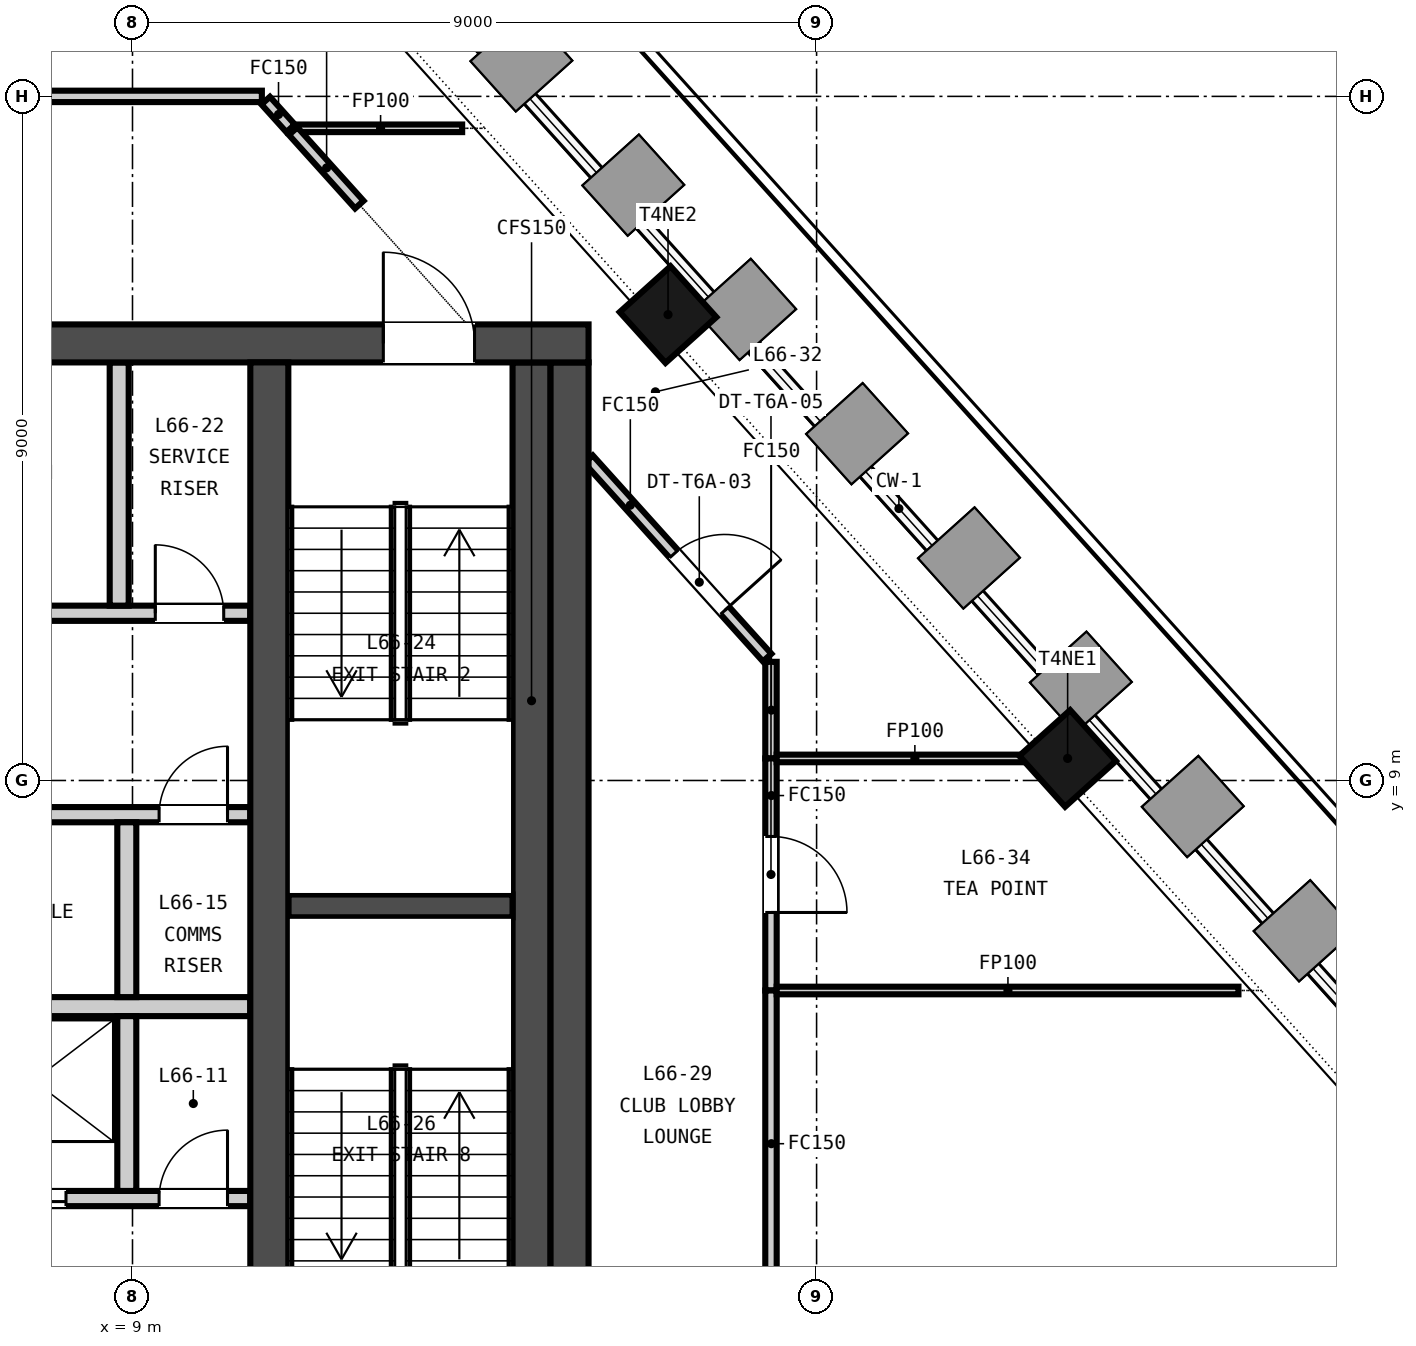
"""IFC4 building model, lengths in metres.
Left out: names, types, materials, properties, quantities, classifications, styles, units other than length and angle.
Written with IfcOpenShell. Run it as: python <this file> out.ifc"""

import sys

from ifc_helpers import new_model, si_unit, direction, frame, frame_2d, origin, origin_2d, place, context, subcontext, project, spatial, rectangle, extrude, element, fill, save


model = new_model("IFC4")
c1 = context("Model", 3, precision=1e-05, world=origin(), true_north=direction((0.0, 1.0)))
c2 = subcontext(c1, "Body", "Model", "MODEL_VIEW")
j1 = project(units=[si_unit("LENGTHUNIT", "METRE"), si_unit("PLANEANGLEUNIT", "RADIAN")], contexts=[c1])
p1 = place(None, origin())
s1 = spatial("IfcSite", under=j1, at=p1, CompositionType="ELEMENT")
p2 = place(p1, origin())
s2 = spatial("IfcBuilding", under=s1, at=p2, CompositionType="ELEMENT")
p3 = place(p2, frame((0.0, 0.0, 260.95)))
s3 = spatial("IfcBuildingStorey", under=s2, at=p3, CompositionType="ELEMENT", Elevation=260.95)
p4 = place(p3, frame((-15.0, 14.75, -0.15), z_axis=(0.0, 0.0, 1.0), x_axis=(1.0, 0.0, 0.0)))
e1 = element("IfcWall", 1, at=p4, inside=s3, PredefinedType="SOLIDWALL", context=c2, shape_type="SweptSolid", body=[
    extrude(rectangle(XDim=30.0, YDim=0.5, at=frame_2d((15.0, 0.0))), origin(), (0.0, 0.0, 1.0), 3.65),
])
p5 = place(p4, frame((9.25, 0.0, 0.15)))
e2 = element("IfcOpeningElement", 2, at=p5, cuts=e1, PredefinedType="OPENING", context=c2, shape_type="SweptSolid", body=[
    extrude(rectangle(XDim=1.5, YDim=2.1, at=frame_2d((0.75, 1.05))), frame((0.0, 0.26, 0.0), z_axis=(0.0, -1.0, 0.0), x_axis=(1.0, 0.0, 0.0)), (0.0, 0.0, 1.0), 0.52),
])
p6 = place(p4, frame((19.4, 0.0, 0.15)))
e3 = element("IfcOpeningElement", 3, at=p6, cuts=e1, PredefinedType="OPENING", context=c2, shape_type="SweptSolid", body=[
    extrude(rectangle(XDim=1.5, YDim=2.1, at=frame_2d((0.75, 1.05))), frame((0.0, 0.26, 0.0), z_axis=(0.0, -1.0, 0.0), x_axis=(1.0, 0.0, 0.0)), (0.0, 0.0, 1.0), 0.52),
])
p7 = place(p4, frame((1.5, 0.0, 0.15)))
e4 = element("IfcOpeningElement", 4, at=p7, cuts=e1, PredefinedType="OPENING", context=c2, shape_type="SweptSolid", body=[
    extrude(rectangle(XDim=1.2, YDim=2.1, at=frame_2d((0.6, 1.05))), frame((0.0, 0.26, 0.0), z_axis=(0.0, -1.0, 0.0), x_axis=(1.0, 0.0, 0.0)), (0.0, 0.0, 1.0), 0.52),
])
p8 = place(p4, frame((27.3, 0.0, 0.15)))
e5 = element("IfcOpeningElement", 5, at=p8, cuts=e1, PredefinedType="OPENING", context=c2, shape_type="SweptSolid", body=[
    extrude(rectangle(XDim=1.2, YDim=2.1, at=frame_2d((0.6, 1.05))), frame((0.0, 0.26, 0.0), z_axis=(0.0, -1.0, 0.0), x_axis=(1.0, 0.0, 0.0)), (0.0, 0.0, 1.0), 0.52),
])
for number, where, z_axis, x_axis in (
    (6, (14.75, 0.5, -0.15), (0.0, 0.0, 1.0), (0.0, 1.0, 0.0)),
    (7, (10.8, 0.5, -0.15), (0.0, 0.0, 1.0), (0.0, 1.0, 0.0)),
):
    element("IfcWall", number, at=place(p3, frame(where, z_axis=z_axis, x_axis=x_axis)), inside=s3, PredefinedType="SOLIDWALL", context=c2, shape_type="SweptSolid", body=[
        extrude(rectangle(XDim=14.0, YDim=0.5, at=frame_2d((7.0, 0.0))), origin(), (0.0, 0.0, 1.0), 3.65),
    ])
for number, where, z_axis, x_axis in (
    (8, (21.303, 9.29, -0.15), (0.0, 0.0, 1.0), (-0.669, 0.743, 0.0)),
    (9, (16.045, 15.129, -0.15), (0.0, 0.0, 1.0), (-0.669, 0.743, 0.0)),
):
    element("IfcColumn", number, at=place(p3, frame(where, z_axis=z_axis, x_axis=x_axis)), inside=s3, PredefinedType="COLUMN", context=c2, shape_type="SweptSolid", body=[
        extrude(rectangle(XDim=0.9, YDim=0.9, at=origin_2d()), origin(), (0.0, 0.0, 1.0), 3.65),
    ])
p9 = place(p3, frame((-10.55, 3.5, 0.0), z_axis=(0.0, 0.0, 1.0), x_axis=(1.0, 0.0, 0.0)))
e10 = element("IfcWall", 10, at=p9, inside=s3, PredefinedType="PARTITIONING", context=c2, shape_type="SweptSolid", body=[
    extrude(rectangle(XDim=21.1, YDim=0.2, at=frame_2d((10.55, 0.0))), origin(), (0.0, 0.0, 1.0), 3.5),
])
p10 = place(p9, frame((0.675, 0.0, 0.0)))
e11 = element("IfcOpeningElement", 11, at=p10, cuts=e10, PredefinedType="OPENING", context=c2, shape_type="SweptSolid", body=[
    extrude(rectangle(XDim=1.2, YDim=2.1, at=frame_2d((0.6, 1.05))), frame((0.0, 0.11, 0.0), z_axis=(0.0, -1.0, 0.0), x_axis=(1.0, 0.0, 0.0)), (0.0, 0.0, 1.0), 0.22),
])
p11 = place(p9, frame((3.475, 0.0, 0.0)))
e12 = element("IfcOpeningElement", 12, at=p11, cuts=e10, PredefinedType="OPENING", context=c2, shape_type="SweptSolid", body=[
    extrude(rectangle(XDim=1.2, YDim=2.1, at=frame_2d((0.6, 1.05))), frame((0.0, 0.11, 0.0), z_axis=(0.0, -1.0, 0.0), x_axis=(1.0, 0.0, 0.0)), (0.0, 0.0, 1.0), 0.22),
])
p12 = place(p9, frame((6.275, 0.0, 0.0)))
e13 = element("IfcOpeningElement", 13, at=p12, cuts=e10, PredefinedType="OPENING", context=c2, shape_type="SweptSolid", body=[
    extrude(rectangle(XDim=1.2, YDim=2.1, at=frame_2d((0.6, 1.05))), frame((0.0, 0.11, 0.0), z_axis=(0.0, -1.0, 0.0), x_axis=(1.0, 0.0, 0.0)), (0.0, 0.0, 1.0), 0.22),
])
p13 = place(p9, frame((9.075, 0.0, 0.0)))
e14 = element("IfcOpeningElement", 14, at=p13, cuts=e10, PredefinedType="OPENING", context=c2, shape_type="SweptSolid", body=[
    extrude(rectangle(XDim=1.2, YDim=2.1, at=frame_2d((0.6, 1.05))), frame((0.0, 0.11, 0.0), z_axis=(0.0, -1.0, 0.0), x_axis=(1.0, 0.0, 0.0)), (0.0, 0.0, 1.0), 0.22),
])
p14 = place(p9, frame((11.875, 0.0, 0.0)))
e15 = element("IfcOpeningElement", 15, at=p14, cuts=e10, PredefinedType="OPENING", context=c2, shape_type="SweptSolid", body=[
    extrude(rectangle(XDim=1.2, YDim=2.1, at=frame_2d((0.6, 1.05))), frame((0.0, 0.11, 0.0), z_axis=(0.0, -1.0, 0.0), x_axis=(1.0, 0.0, 0.0)), (0.0, 0.0, 1.0), 0.22),
])
p15 = place(p9, frame((14.675, 0.0, 0.0)))
e16 = element("IfcOpeningElement", 16, at=p15, cuts=e10, PredefinedType="OPENING", context=c2, shape_type="SweptSolid", body=[
    extrude(rectangle(XDim=1.2, YDim=2.1, at=frame_2d((0.6, 1.05))), frame((0.0, 0.11, 0.0), z_axis=(0.0, -1.0, 0.0), x_axis=(1.0, 0.0, 0.0)), (0.0, 0.0, 1.0), 0.22),
])
p16 = place(p9, frame((17.475, 0.0, 0.0)))
e17 = element("IfcOpeningElement", 17, at=p16, cuts=e10, PredefinedType="OPENING", context=c2, shape_type="SweptSolid", body=[
    extrude(rectangle(XDim=1.2, YDim=2.1, at=frame_2d((0.6, 1.05))), frame((0.0, 0.11, 0.0), z_axis=(0.0, -1.0, 0.0), x_axis=(1.0, 0.0, 0.0)), (0.0, 0.0, 1.0), 0.22),
])
p17 = place(p9, frame((19.9, 0.0, 0.0)))
e18 = element("IfcOpeningElement", 18, at=p17, cuts=e10, PredefinedType="OPENING", context=c2, shape_type="SweptSolid", body=[
    extrude(rectangle(XDim=0.9, YDim=2.1, at=frame_2d((0.45, 1.05))), frame((0.0, 0.11, 0.0), z_axis=(0.0, -1.0, 0.0), x_axis=(1.0, 0.0, 0.0)), (0.0, 0.0, 1.0), 0.22),
])
p18 = place(p3, frame((-10.55, 6.025, 0.0), z_axis=(0.0, 0.0, 1.0), x_axis=(1.0, 0.0, 0.0)))
e19 = element("IfcWall", 19, at=p18, inside=s3, PredefinedType="PARTITIONING", context=c2, shape_type="SweptSolid", body=[
    extrude(rectangle(XDim=21.1, YDim=0.25, at=frame_2d((10.55, 0.0))), origin(), (0.0, 0.0, 1.0), 3.5),
])
p19 = place(p3, frame((-4.125, 8.55, 0.0), z_axis=(0.0, 0.0, 1.0), x_axis=(1.0, 0.0, 0.0)))
e20 = element("IfcWall", 20, at=p19, inside=s3, PredefinedType="PARTITIONING", context=c2, shape_type="SweptSolid", body=[
    extrude(rectangle(XDim=14.675, YDim=0.2, at=frame_2d((7.337, 0.0))), origin(), (0.0, 0.0, 1.0), 3.5),
])
p20 = place(p19, frame((1.413, 0.0, 0.0)))
e21 = element("IfcOpeningElement", 21, at=p20, cuts=e20, PredefinedType="OPENING", context=c2, shape_type="SweptSolid", body=[
    extrude(rectangle(XDim=1.0, YDim=2.1, at=frame_2d((0.5, 1.05))), frame((0.0, 0.11, 0.0), z_axis=(0.0, -1.0, 0.0), x_axis=(1.0, 0.0, 0.0)), (0.0, 0.0, 1.0), 0.22),
])
p21 = place(p19, frame((5.0, 0.0, 0.0)))
e22 = element("IfcOpeningElement", 22, at=p21, cuts=e20, PredefinedType="OPENING", context=c2, shape_type="SweptSolid", body=[
    extrude(rectangle(XDim=1.0, YDim=2.1, at=frame_2d((0.5, 1.05))), frame((0.0, 0.11, 0.0), z_axis=(0.0, -1.0, 0.0), x_axis=(1.0, 0.0, 0.0)), (0.0, 0.0, 1.0), 0.22),
])
p22 = place(p19, frame((9.613, 0.0, 0.0)))
e23 = element("IfcOpeningElement", 23, at=p22, cuts=e20, PredefinedType="OPENING", context=c2, shape_type="SweptSolid", body=[
    extrude(rectangle(XDim=1.0, YDim=2.1, at=frame_2d((0.5, 1.05))), frame((0.0, 0.11, 0.0), z_axis=(0.0, -1.0, 0.0), x_axis=(1.0, 0.0, 0.0)), (0.0, 0.0, 1.0), 0.22),
])
p23 = place(p19, frame((13.475, 0.0, 0.0)))
e24 = element("IfcOpeningElement", 24, at=p23, cuts=e20, PredefinedType="OPENING", context=c2, shape_type="SweptSolid", body=[
    extrude(rectangle(XDim=0.9, YDim=2.1, at=frame_2d((0.45, 1.05))), frame((0.0, 0.11, 0.0), z_axis=(0.0, -1.0, 0.0), x_axis=(1.0, 0.0, 0.0)), (0.0, 0.0, 1.0), 0.22),
])
p24 = place(p3, frame((5.9, 11.2, 0.0), z_axis=(0.0, 0.0, 1.0), x_axis=(1.0, 0.0, 0.0)))
e25 = element("IfcWall", 25, at=p24, inside=s3, PredefinedType="PARTITIONING", context=c2, shape_type="SweptSolid", body=[
    extrude(rectangle(XDim=4.65, YDim=0.2, at=frame_2d((2.325, 0.0))), origin(), (0.0, 0.0, 1.0), 3.5),
])
p25 = place(p24, frame((1.075, 0.0, 0.0)))
e26 = element("IfcOpeningElement", 26, at=p25, cuts=e25, PredefinedType="OPENING", context=c2, shape_type="SweptSolid", body=[
    extrude(rectangle(XDim=0.9, YDim=2.1, at=frame_2d((0.45, 1.05))), frame((0.0, 0.11, 0.0), z_axis=(0.0, -1.0, 0.0), x_axis=(1.0, 0.0, 0.0)), (0.0, 0.0, 1.0), 0.22),
])
p26 = place(p24, frame((3.4, 0.0, 0.0)))
e27 = element("IfcOpeningElement", 27, at=p26, cuts=e25, PredefinedType="OPENING", context=c2, shape_type="SweptSolid", body=[
    extrude(rectangle(XDim=0.9, YDim=2.1, at=frame_2d((0.45, 1.05))), frame((0.0, 0.11, 0.0), z_axis=(0.0, -1.0, 0.0), x_axis=(1.0, 0.0, 0.0)), (0.0, 0.0, 1.0), 0.22),
])
p27 = place(p3, frame((8.925, 3.6, 0.0), z_axis=(0.0, 0.0, 1.0), x_axis=(0.0, 1.0, 0.0)))
e28 = element("IfcWall", 28, at=p27, inside=s3, PredefinedType="PARTITIONING", context=c2, shape_type="SweptSolid", body=[
    extrude(rectangle(XDim=2.3, YDim=0.25, at=frame_2d((1.15, 0.0))), origin(), (0.0, 0.0, 1.0), 3.5),
])
p28 = place(p3, frame((8.925, 6.15, 0.0), z_axis=(0.0, 0.0, 1.0), x_axis=(0.0, 1.0, 0.0)))
e29 = element("IfcWall", 29, at=p28, inside=s3, PredefinedType="PARTITIONING", context=c2, shape_type="SweptSolid", body=[
    extrude(rectangle(XDim=2.3, YDim=0.25, at=frame_2d((1.15, 0.0))), origin(), (0.0, 0.0, 1.0), 3.5),
])
p29 = place(p3, frame((8.825, 11.3, 0.0), z_axis=(0.0, 0.0, 1.0), x_axis=(0.0, 1.0, 0.0)))
e30 = element("IfcWall", 30, at=p29, inside=s3, PredefinedType="PARTITIONING", context=c2, shape_type="SweptSolid", body=[
    extrude(rectangle(XDim=3.2, YDim=0.25, at=frame_2d((1.6, 0.0))), origin(), (0.0, 0.0, 1.0), 3.5),
])
p30 = place(p3, frame((11.05, 7.35, 0.0), z_axis=(0.0, 0.0, 1.0), x_axis=(1.0, 0.0, 0.0)))
e31 = element("IfcWall", 31, at=p30, inside=s3, PredefinedType="SOLIDWALL", context=c2, shape_type="SweptSolid", body=[
    extrude(rectangle(XDim=2.95, YDim=0.3, at=frame_2d((1.475, 0.0))), origin(), (0.0, 0.0, 1.0), 3.5),
])
p31 = place(p3, frame((14.25, 0.5, 0.0), z_axis=(0.0, 0.0, 1.0), x_axis=(0.0, 1.0, 0.0)))
e32 = element("IfcWall", 32, at=p31, inside=s3, PredefinedType="SOLIDWALL", context=c2, shape_type="SweptSolid", body=[
    extrude(rectangle(XDim=14.0, YDim=0.5, at=frame_2d((7.0, 0.0))), origin(), (0.0, 0.0, 1.0), 3.5),
])
p32 = place(p3, frame((17.4, 10.561, 0.0), z_axis=(0.0, 0.0, 1.0), x_axis=(0.0, -1.0, 0.0)))
e33 = element("IfcWall", 33, at=p32, inside=s3, PredefinedType="PARTITIONING", context=c2, shape_type="SweptSolid", body=[
    extrude(rectangle(XDim=1.271, YDim=0.15, at=frame_2d((0.635, 0.0))), origin(), (0.0, 0.0, 1.0), 2.751),
])
p33 = place(p3, frame((17.4, 9.29, 0.0), z_axis=(0.0, 0.0, 1.0), x_axis=(0.0, -1.0, 0.0)))
e34 = element("IfcWall", 34, at=p33, inside=s3, PredefinedType="PARTITIONING", context=c2, shape_type="SweptSolid", body=[
    extrude(rectangle(XDim=3.053, YDim=0.15, at=frame_2d((1.526, 0.0))), origin(), (0.0, 0.0, 1.0), 2.751),
])
p34 = place(p33, frame((1.027, 0.0, 0.0)))
e35 = element("IfcOpeningElement", 35, at=p34, cuts=e34, PredefinedType="OPENING", context=c2, shape_type="SweptSolid", body=[
    extrude(rectangle(XDim=1.0, YDim=2.1, at=frame_2d((0.5, 1.05))), frame((0.0, 0.085, 0.0), z_axis=(0.0, -1.0, 0.0), x_axis=(1.0, 0.0, 0.0)), (0.0, 0.0, 1.0), 0.17),
])
p35 = place(p3, frame((17.4, 6.237, 0.0), z_axis=(0.0, 0.0, 1.0), x_axis=(0.0, -1.0, 0.0)))
e36 = element("IfcWall", 36, at=p35, inside=s3, PredefinedType="PARTITIONING", context=c2, shape_type="SweptSolid", body=[
    extrude(rectangle(XDim=9.162, YDim=0.15, at=frame_2d((4.581, 0.0))), origin(), (0.0, 0.0, 1.0), 2.751),
])
p36 = place(p35, frame((4.081, 0.0, 0.0)))
e37 = element("IfcOpeningElement", 37, at=p36, cuts=e36, PredefinedType="OPENING", context=c2, shape_type="SweptSolid", body=[
    extrude(rectangle(XDim=1.0, YDim=2.1, at=frame_2d((0.5, 1.05))), frame((0.0, 0.085, 0.0), z_axis=(0.0, -1.0, 0.0), x_axis=(1.0, 0.0, 0.0)), (0.0, 0.0, 1.0), 0.17),
])
p37 = place(p3, frame((-0.125, 18.0, 0.0), z_axis=(0.0, 0.0, 1.0), x_axis=(1.0, 0.0, 0.0)))
e38 = element("IfcWall", 38, at=p37, inside=s3, PredefinedType="PARTITIONING", context=c2, shape_type="SweptSolid", body=[
    extrude(rectangle(XDim=10.827, YDim=0.15, at=frame_2d((5.414, 0.0))), origin(), (0.0, 0.0, 1.0), 2.751),
])
p38 = place(p37, frame((4.914, 0.0, 0.0)))
e39 = element("IfcOpeningElement", 39, at=p38, cuts=e38, PredefinedType="OPENING", context=c2, shape_type="SweptSolid", body=[
    extrude(rectangle(XDim=1.0, YDim=2.1, at=frame_2d((0.5, 1.05))), frame((0.0, 0.085, 0.0), z_axis=(0.0, -1.0, 0.0), x_axis=(1.0, 0.0, 0.0)), (0.0, 0.0, 1.0), 0.17),
])
p39 = place(p3, frame((10.752, 17.944, 0.0), z_axis=(0.0, 0.0, 1.0), x_axis=(0.669019774343, -0.74324460411, 0.0)))
e40 = element("IfcWall", 40, at=p39, inside=s3, PredefinedType="PARTITIONING", context=c2, shape_type="SweptSolid", body=[
    extrude(rectangle(XDim=0.49, YDim=0.15, at=frame_2d((0.245, 0.0))), origin(), (0.0, 0.0, 1.0), 2.751),
])
p40 = place(p3, frame((11.181, 17.58, 0.0), z_axis=(0.0, 0.0, 1.0), x_axis=(1.0, 0.0, 0.0)))
e41 = element("IfcWall", 41, at=p40, inside=s3, PredefinedType="PARTITIONING", context=c2, shape_type="SweptSolid", body=[
    extrude(rectangle(XDim=2.156, YDim=0.1, at=frame_2d((1.078, 0.0))), origin(), (0.0, 0.0, 1.0), 2.751),
])
p41 = place(p3, frame((11.114, 17.543, 0.0), z_axis=(0.0, 0.0, 1.0), x_axis=(0.669172057426, -0.743107500675, 0.0)))
e42 = element("IfcWall", 42, at=p41, inside=s3, PredefinedType="PARTITIONING", context=c2, shape_type="SweptSolid", body=[
    extrude(rectangle(XDim=1.301, YDim=0.15, at=frame_2d((0.65, 0.0))), origin(), (0.0, 0.0, 1.0), 2.751),
])
p42 = place(p3, frame((15.0, 13.226, 0.0), z_axis=(0.0, 0.0, 1.0), x_axis=(0.669187491984, -0.743093601488, 0.0)))
e43 = element("IfcWall", 43, at=p42, inside=s3, PredefinedType="PARTITIONING", context=c2, shape_type="SweptSolid", body=[
    extrude(rectangle(XDim=3.511, YDim=0.15, at=frame_2d((1.756, 0.0))), origin(), (0.0, 0.0, 1.0), 2.751),
])
p43 = place(p42, frame((1.677, 0.0, 0.0)))
e44 = element("IfcOpeningElement", 44, at=p43, cuts=e43, PredefinedType="OPENING", context=c2, shape_type="SweptSolid", body=[
    extrude(rectangle(XDim=1.0, YDim=2.1, at=frame_2d((0.5, 1.05))), frame((0.0, 0.085, 0.0), z_axis=(0.0, -1.0, 0.0), x_axis=(1.0, 0.0, 0.0)), (0.0, 0.0, 1.0), 0.17),
])
p44 = place(p3, frame((17.475, 9.29, 0.0), z_axis=(0.0, 0.0, 1.0), x_axis=(1.0, 0.0, 0.0)))
e45 = element("IfcWall", 45, at=p44, inside=s3, PredefinedType="PARTITIONING", context=c2, shape_type="SweptSolid", body=[
    extrude(rectangle(XDim=3.626, YDim=0.1, at=frame_2d((1.813, 0.0))), origin(), (0.0, 0.0, 1.0), 2.751),
])
p45 = place(p3, frame((17.475, 6.237, 0.0), z_axis=(0.0, 0.0, 1.0), x_axis=(1.0, 0.0, 0.0)))
e46 = element("IfcWall", 46, at=p45, inside=s3, PredefinedType="PARTITIONING", context=c2, shape_type="SweptSolid", body=[
    extrude(rectangle(XDim=6.075, YDim=0.1, at=frame_2d((3.038, 0.0))), origin(), (0.0, 0.0, 1.0), 2.751),
])
p46 = place(p16, origin())
e47 = element("IfcDoor", 47, at=p46, inside=s3, OperationType="DOUBLE_DOOR_SLIDING", PredefinedType="DOOR", context=c2, shape_type="SweptSolid", body=[
    extrude(rectangle(XDim=1.2, YDim=2.1, at=frame_2d((0.6, 1.05))), frame((0.0, 0.025, 0.0), z_axis=(0.0, -1.0, 0.0), x_axis=(1.0, 0.0, 0.0)), (0.0, 0.0, 1.0), 0.05),
])
fill(e17, e47)
p47 = place(p17, origin())
e48 = element("IfcDoor", 48, at=p47, inside=s3, OperationType="SINGLE_SWING_RIGHT", PredefinedType="DOOR", context=c2, shape_type="SweptSolid", body=[
    extrude(rectangle(XDim=0.9, YDim=2.1, at=frame_2d((0.45, 1.05))), frame((0.0, 0.025, 0.0), z_axis=(0.0, -1.0, 0.0), x_axis=(1.0, 0.0, 0.0)), (0.0, 0.0, 1.0), 0.05),
])
fill(e18, e48)
p48 = place(p23, origin())
e49 = element("IfcDoor", 49, at=p48, inside=s3, OperationType="SINGLE_SWING_RIGHT", PredefinedType="DOOR", context=c2, shape_type="SweptSolid", body=[
    extrude(rectangle(XDim=0.9, YDim=2.1, at=frame_2d((0.45, 1.05))), frame((0.0, 0.025, 0.0), z_axis=(0.0, -1.0, 0.0), x_axis=(1.0, 0.0, 0.0)), (0.0, 0.0, 1.0), 0.05),
])
fill(e24, e49)
p49 = place(p26, origin())
e50 = element("IfcDoor", 50, at=p49, inside=s3, OperationType="SINGLE_SWING_LEFT", PredefinedType="DOOR", context=c2, shape_type="SweptSolid", body=[
    extrude(rectangle(XDim=0.9, YDim=2.1, at=frame_2d((0.45, 1.05))), frame((0.0, 0.025, 0.0), z_axis=(0.0, -1.0, 0.0), x_axis=(1.0, 0.0, 0.0)), (0.0, 0.0, 1.0), 0.05),
])
fill(e27, e50)
p50 = place(p8, origin())
e51 = element("IfcDoor", 51, at=p50, inside=s3, OperationType="SINGLE_SWING_LEFT", PredefinedType="DOOR", context=c2, shape_type="SweptSolid", body=[
    extrude(rectangle(XDim=1.2, YDim=2.1, at=frame_2d((0.6, 1.05))), frame((0.0, 0.025, 0.0), z_axis=(0.0, -1.0, 0.0), x_axis=(1.0, 0.0, 0.0)), (0.0, 0.0, 1.0), 0.05),
])
fill(e5, e51)
p51 = place(p43, origin())
e52 = element("IfcDoor", 52, at=p51, inside=s3, OperationType="SINGLE_SWING_RIGHT", PredefinedType="DOOR", context=c2, shape_type="SweptSolid", body=[
    extrude(rectangle(XDim=1.0, YDim=2.1, at=frame_2d((0.5, 1.05))), frame((0.0, 0.025, 0.0), z_axis=(0.0, -1.0, 0.0), x_axis=(1.0, 0.0, 0.0)), (0.0, 0.0, 1.0), 0.05),
])
fill(e44, e52)
p52 = place(p34, origin())
e53 = element("IfcDoor", 53, at=p52, inside=s3, OperationType="SINGLE_SWING_RIGHT", PredefinedType="DOOR", context=c2, shape_type="SweptSolid", body=[
    extrude(rectangle(XDim=1.0, YDim=2.1, at=frame_2d((0.5, 1.05))), frame((0.0, 0.025, 0.0), z_axis=(0.0, -1.0, 0.0), x_axis=(1.0, 0.0, 0.0)), (0.0, 0.0, 1.0), 0.05),
])
fill(e35, e53)
save(model, sys.argv[1])
